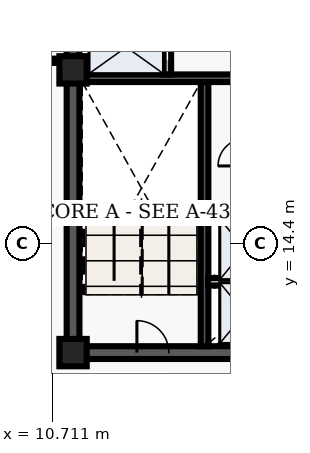
"""IFC4 building model, lengths in metres.
Left out: names, types, materials, properties, quantities, classifications, styles, units other than length and angle.
Written with IfcOpenShell. Run it as: python <this file> out.ifc"""

import sys

from ifc_helpers import new_model, entity, si_unit, converted_unit, direction, frame, origin_with_axes, origin_2d_with_axis, place, context, subcontext, project, spatial, polyline, rectangle, outline, extrude, element, fill, save


model = new_model("IFC4")
c1 = context("Model", 3, precision=1e-05, world=origin_with_axes(), true_north=direction((0.0, 1.0)))
c2 = subcontext(c1, "Body", "Model", "MODEL_VIEW")
j1 = project(units=[si_unit("LENGTHUNIT", "METRE"), converted_unit("PLANEANGLEUNIT", "DEGREE", entity("IfcPlaneAngleMeasure", 0.017), si_unit("PLANEANGLEUNIT", "RADIAN"), dimensions=[0, 0, 0, 0, 0, 0, 0])], contexts=[c1])
p1 = place(None, origin_with_axes())
s1 = spatial("IfcSite", under=j1, at=p1, CompositionType="ELEMENT")
p2 = place(p1, origin_with_axes())
s2 = spatial("IfcBuilding", under=s1, at=p2, CompositionType="ELEMENT")
p3 = place(p2, frame((0.0, 0.0, 236.4), z_axis=(0.0, 0.0, 1.0), x_axis=(1.0, 0.0, 0.0)))
s3 = spatial("IfcBuildingStorey", under=s2, at=p3, CompositionType="ELEMENT", Elevation=236.4)
p4 = place(p3, frame((11.4, 10.8, 0.0), z_axis=(0.0, 0.0, 1.0), x_axis=(0.0, 1.0, 0.0)))
e1 = element("IfcWall", 1, at=p4, inside=s3, PredefinedType="SHEAR", context=c2, shape_type="SweptSolid", body=[
    extrude(outline(polyline([(0.0, -0.21), (27.0, -0.21), (27.0, 0.21), (0.0, 0.21), (0.0, -0.21)])), origin_with_axes(), (0.0, 0.0, 1.0), 3.66),
])
p5 = place(p3, frame((11.4, 10.8, 0.0), z_axis=(0.0, 0.0, 1.0), x_axis=(1.0, 0.0, 0.0)))
e2 = element("IfcWall", 2, at=p5, inside=s3, PredefinedType="SHEAR", context=c2, shape_type="SweptSolid", body=[
    extrude(outline(polyline([(0.0, -0.21), (7.2, -0.21), (7.2, 0.21), (0.0, 0.21), (0.0, -0.21)])), origin_with_axes(), (0.0, 0.0, 1.0), 3.66),
])
p6 = place(p5, frame((2.625, 0.0, 0.0), z_axis=(0.0, 0.0, 1.0), x_axis=(1.0, 0.0, 0.0)))
e3 = element("IfcOpeningElement", 3, at=p6, cuts=e2, PredefinedType="OPENING", context=c2, shape_type="SweptSolid", body=[
    extrude(rectangle(XDim=1.05, YDim=0.44, at=origin_2d_with_axis()), origin_with_axes(), (0.0, 0.0, 1.0), 2.15),
])
p7 = place(p3, frame((15.725, 11.01, 0.0), z_axis=(0.0, 0.0, 1.0), x_axis=(0.0, 1.0, 0.0)))
e4 = element("IfcWall", 4, at=p7, inside=s3, PredefinedType="SHEAR", context=c2, shape_type="SweptSolid", body=[
    extrude(outline(polyline([(0.0, -0.125), (8.69, -0.125), (8.69, 0.125), (0.0, 0.125), (0.0, -0.125)])), origin_with_axes(), (0.0, 0.0, 1.0), 3.66),
])
p8 = place(p3, frame((11.61, 19.825, 0.0), z_axis=(0.0, 0.0, 1.0), x_axis=(1.0, 0.0, 0.0)))
e5 = element("IfcWall", 5, at=p8, inside=s3, PredefinedType="SHEAR", context=c2, shape_type="SweptSolid", body=[
    extrude(outline(polyline([(0.0, -0.125), (6.78, -0.125), (6.78, 0.125), (0.0, 0.125), (0.0, -0.125)])), origin_with_axes(), (0.0, 0.0, 1.0), 3.66),
])
p9 = place(p3, frame((14.5, 19.95, 0.0), z_axis=(0.0, 0.0, 1.0), x_axis=(0.0, 1.0, 0.0)))
e6 = element("IfcWall", 6, at=p9, inside=s3, PredefinedType="SOLIDWALL", context=c2, shape_type="SweptSolid", body=[
    extrude(outline(polyline([(0.0, -0.125), (6.25, -0.125), (6.25, 0.125), (0.0, 0.125), (0.0, -0.125)])), origin_with_axes(), (0.0, 0.0, 1.0), 2.7),
])
p10 = place(p9, frame((1.025, 0.0, 0.0), z_axis=(0.0, 0.0, 1.0), x_axis=(1.0, 0.0, 0.0)))
e7 = element("IfcOpeningElement", 7, at=p10, cuts=e6, PredefinedType="OPENING", context=c2, shape_type="SweptSolid", body=[
    extrude(rectangle(XDim=1.1, YDim=0.27, at=origin_2d_with_axis()), origin_with_axes(), (0.0, 0.0, 1.0), 2.15),
])
p11 = place(p9, frame((2.975, 0.0, 0.0), z_axis=(0.0, 0.0, 1.0), x_axis=(1.0, 0.0, 0.0)))
e8 = element("IfcOpeningElement", 8, at=p11, cuts=e6, PredefinedType="OPENING", context=c2, shape_type="SweptSolid", body=[
    extrude(rectangle(XDim=1.1, YDim=0.27, at=origin_2d_with_axis()), origin_with_axes(), (0.0, 0.0, 1.0), 2.15),
])
p12 = place(p9, frame((5.425, 0.0, 0.0), z_axis=(0.0, 0.0, 1.0), x_axis=(1.0, 0.0, 0.0)))
e9 = element("IfcOpeningElement", 9, at=p12, cuts=e6, PredefinedType="OPENING", context=c2, shape_type="SweptSolid", body=[
    extrude(rectangle(XDim=1.2, YDim=0.27, at=origin_2d_with_axis()), origin_with_axes(), (0.0, 0.0, 1.0), 2.15),
])
for number, where, z_axis, x_axis in (
    (10, (11.4, 10.8, 0.0), (0.0, 0.0, 1.0), (1.0, 0.0, 0.0)),
    (11, (11.4, 20.1, 0.0), (0.0, 0.0, 1.0), (1.0, 0.0, 0.0)),
):
    element("IfcColumn", number, at=place(p3, frame(where, z_axis=z_axis, x_axis=x_axis)), inside=s3, PredefinedType="COLUMN", context=c2, shape_type="SweptSolid", body=[
        extrude(rectangle(XDim=0.9, YDim=0.9, at=origin_2d_with_axis()), origin_with_axes(), (0.0, 0.0, 1.0), 3.9),
    ])
for number, where, z_axis, x_axis in (
    (12, (15.84, 13.13, 0.0), (0.0, 0.0, 1.0), (1.0, 0.0, 0.0)),
    (13, (15.84, 15.27, 0.0), (0.0, 0.0, 1.0), (1.0, 0.0, 0.0)),
):
    element("IfcWall", number, at=place(p3, frame(where, z_axis=z_axis, x_axis=x_axis)), inside=s3, PredefinedType="SOLIDWALL", context=c2, shape_type="SweptSolid", body=[
        extrude(outline(polyline([(0.0, -0.125), (2.46, -0.125), (2.46, 0.125), (0.0, 0.125), (0.0, -0.125)])), origin_with_axes(), (0.0, 0.0, 1.0), 2.7),
    ])
p13 = place(p3, frame((9.52, 20.4, 0.0), z_axis=(0.0, 0.0, 1.0), x_axis=(1.0, 0.0, 0.0)))
e14 = element("IfcWall", 14, at=p13, inside=s3, PredefinedType="PARTITIONING", context=c2, shape_type="SweptSolid", body=[
    extrude(outline(polyline([(0.0, -0.07), (1.58, -0.07), (1.58, 0.07), (0.0, 0.07), (0.0, -0.07)])), origin_with_axes(), (0.0, 0.0, 1.0), 2.7),
])
p14 = place(p9, frame((1.025, 0.0, 0.0), z_axis=(0.0, 0.0, 1.0), x_axis=(1.0, 0.0, 0.0)))
e15 = element("IfcDoor", 15, at=p14, inside=s3, OperationType="SLIDING_TO_LEFT", PredefinedType="DOOR", context=c2, shape_type="SweptSolid", body=[
    extrude(rectangle(XDim=1.1, YDim=0.09, at=origin_2d_with_axis()), origin_with_axes(), (0.0, 0.0, 1.0), 2.15),
])
fill(e7, e15)
p15 = place(p5, frame((2.625, 0.0, 0.0), z_axis=(0.0, 0.0, 1.0), x_axis=(1.0, 0.0, 0.0)))
e16 = element("IfcDoor", 16, at=p15, inside=s3, OperationType="SINGLE_SWING_LEFT", PredefinedType="DOOR", context=c2, shape_type="SweptSolid", body=[
    extrude(rectangle(XDim=1.05, YDim=0.09, at=origin_2d_with_axis()), origin_with_axes(), (0.0, 0.0, 1.0), 2.15),
])
fill(e3, e16)
save(model, sys.argv[1])
